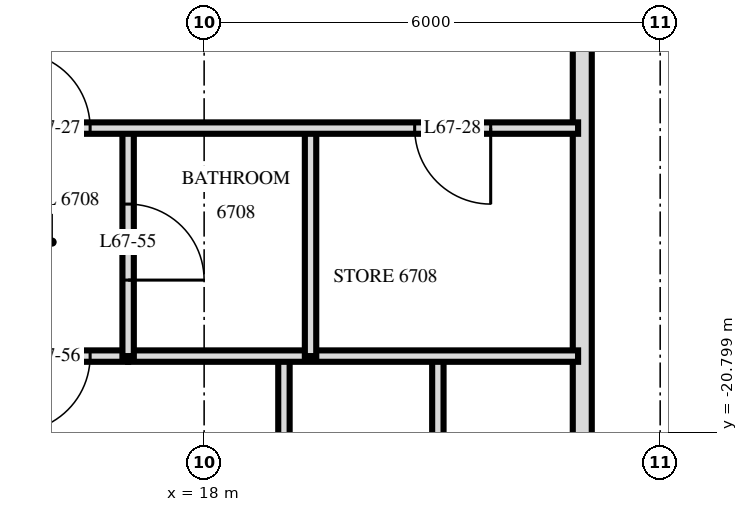
"""IFC4 building model, lengths in metres.
Left out: names, types, materials, properties, quantities, classifications, styles, units other than length and angle.
Written with IfcOpenShell. Run it as: python <this file> out.ifc"""

import sys

from ifc_helpers import new_model, si_unit, direction, frame, frame_2d, origin, place, context, subcontext, project, spatial, rectangle, extrude, element, fill, save


model = new_model("IFC4")
c1 = context("Model", 3, precision=1e-05, world=origin(), true_north=direction((0.0, 1.0)))
c2 = subcontext(c1, "Body", "Model", "MODEL_VIEW")
j1 = project(units=[si_unit("LENGTHUNIT", "METRE"), si_unit("PLANEANGLEUNIT", "RADIAN")], contexts=[c1])
p1 = place(None, origin())
s1 = spatial("IfcSite", under=j1, at=p1, CompositionType="ELEMENT")
p2 = place(p1, origin())
s2 = spatial("IfcBuilding", under=s1, at=p2, CompositionType="ELEMENT")
p3 = place(p2, frame((0.0, 0.0, 256.1)))
s3 = spatial("IfcBuildingStorey", under=s2, at=p3, CompositionType="ELEMENT", Elevation=256.1)
p4 = place(p3, frame((22.975, -29.275, 0.0), z_axis=(0.0, 0.0, 1.0), x_axis=(0.0, 1.0, 0.0)))
e1 = element("IfcWall", 1, at=p4, inside=s3, PredefinedType="SOLIDWALL", context=c2, shape_type="SweptSolid", body=[
    extrude(rectangle(XDim=25.951, YDim=0.25, at=frame_2d((12.975, 0.0))), origin(), (0.0, 0.0, 1.0), 3.22),
])
p5 = place(p4, frame((0.575, 0.0, 0.0)))
e2 = element("IfcOpeningElement", 2, at=p5, cuts=e1, PredefinedType="OPENING", context=c2, shape_type="SweptSolid", body=[
    extrude(rectangle(XDim=1.8, YDim=2.4, at=frame_2d((0.9, 1.2))), frame((0.0, 0.135, 0.0), z_axis=(0.0, -1.0, 0.0), x_axis=(1.0, 0.0, 0.0)), (0.0, 0.0, 1.0), 0.27),
])
p6 = place(p4, frame((3.325, 0.0, 0.9)))
e3 = element("IfcOpeningElement", 3, at=p6, cuts=e1, PredefinedType="OPENING", context=c2, shape_type="SweptSolid", body=[
    extrude(rectangle(XDim=1.8, YDim=1.5, at=frame_2d((0.9, 0.75))), frame((0.0, 0.135, 0.0), z_axis=(0.0, -1.0, 0.0), x_axis=(1.0, 0.0, 0.0)), (0.0, 0.0, 1.0), 0.27),
])
p7 = place(p4, frame((6.075, 0.0, 0.0)))
e4 = element("IfcOpeningElement", 4, at=p7, cuts=e1, PredefinedType="OPENING", context=c2, shape_type="SweptSolid", body=[
    extrude(rectangle(XDim=1.8, YDim=2.4, at=frame_2d((0.9, 1.2))), frame((0.0, 0.135, 0.0), z_axis=(0.0, -1.0, 0.0), x_axis=(1.0, 0.0, 0.0)), (0.0, 0.0, 1.0), 0.27),
])
p8 = place(p4, frame((14.875, 0.0, 0.0)))
e5 = element("IfcOpeningElement", 5, at=p8, cuts=e1, PredefinedType="OPENING", context=c2, shape_type="SweptSolid", body=[
    extrude(rectangle(XDim=1.8, YDim=2.4, at=frame_2d((0.9, 1.2))), frame((0.0, 0.135, 0.0), z_axis=(0.0, -1.0, 0.0), x_axis=(1.0, 0.0, 0.0)), (0.0, 0.0, 1.0), 0.27),
])
p9 = place(p4, frame((17.575, 0.0, 0.9)))
e6 = element("IfcOpeningElement", 6, at=p9, cuts=e1, PredefinedType="OPENING", context=c2, shape_type="SweptSolid", body=[
    extrude(rectangle(XDim=2.4, YDim=1.5, at=frame_2d((1.2, 0.75))), frame((0.0, 0.135, 0.0), z_axis=(0.0, -1.0, 0.0), x_axis=(1.0, 0.0, 0.0)), (0.0, 0.0, 1.0), 0.27),
])
p10 = place(p4, frame((22.925, 0.0, 0.0)))
e7 = element("IfcOpeningElement", 7, at=p10, cuts=e1, PredefinedType="OPENING", context=c2, shape_type="SweptSolid", body=[
    extrude(rectangle(XDim=1.8, YDim=2.4, at=frame_2d((0.9, 1.2))), frame((0.0, 0.135, 0.0), z_axis=(0.0, -1.0, 0.0), x_axis=(1.0, 0.0, 0.0)), (0.0, 0.0, 1.0), 0.27),
])
p11 = place(p3, frame((21.075, -32.666, 0.0), z_axis=(0.0, 0.0, 1.0), x_axis=(0.0, 1.0, 0.0)))
e8 = element("IfcWall", 8, at=p11, inside=s3, PredefinedType="PARTITIONING", context=c2, shape_type="SweptSolid", body=[
    extrude(rectangle(XDim=12.866, YDim=0.15, at=frame_2d((6.433, 0.0))), origin(), (0.0, 0.0, 1.0), 3.22),
])
p12 = place(p11, frame((5.846, 0.0, 0.0)))
e9 = element("IfcOpeningElement", 9, at=p12, cuts=e8, PredefinedType="OPENING", context=c2, shape_type="SweptSolid", body=[
    extrude(rectangle(XDim=0.9, YDim=2.1, at=frame_2d((0.45, 1.05))), frame((0.0, 0.085, 0.0), z_axis=(0.0, -1.0, 0.0), x_axis=(1.0, 0.0, 0.0)), (0.0, 0.0, 1.0), 0.17),
])
p13 = place(p3, frame((19.4, -19.8, 0.0), z_axis=(0.0, 0.0, 1.0), x_axis=(0.0, 1.0, 0.0)))
e10 = element("IfcWall", 10, at=p13, inside=s3, PredefinedType="PARTITIONING", context=c2, shape_type="SweptSolid", body=[
    extrude(rectangle(XDim=3.0, YDim=0.15, at=frame_2d((1.5, 0.0))), origin(), (0.0, 0.0, 1.0), 3.22),
])
p14 = place(p3, frame((19.05, -33.527, 0.0), z_axis=(0.0, 0.0, 1.0), x_axis=(0.0, 1.0, 0.0)))
e11 = element("IfcWall", 11, at=p14, inside=s3, PredefinedType="PARTITIONING", context=c2, shape_type="SweptSolid", body=[
    extrude(rectangle(XDim=13.727, YDim=0.15, at=frame_2d((6.864, 0.0))), origin(), (0.0, 0.0, 1.0), 3.22),
])
p15 = place(p14, frame((6.307, 0.0, 0.0)))
e12 = element("IfcOpeningElement", 12, at=p15, cuts=e11, PredefinedType="OPENING", context=c2, shape_type="SweptSolid", body=[
    extrude(rectangle(XDim=0.9, YDim=2.1, at=frame_2d((0.45, 1.05))), frame((0.0, 0.085, 0.0), z_axis=(0.0, -1.0, 0.0), x_axis=(1.0, 0.0, 0.0)), (0.0, 0.0, 1.0), 0.17),
])
p16 = place(p3, frame((17.0, -19.8, 0.0), z_axis=(0.0, 0.0, 1.0), x_axis=(0.0, 1.0, 0.0)))
e13 = element("IfcWall", 13, at=p16, inside=s3, PredefinedType="PARTITIONING", context=c2, shape_type="SweptSolid", body=[
    extrude(rectangle(XDim=3.0, YDim=0.15, at=frame_2d((1.5, 0.0))), origin(), (0.0, 0.0, 1.0), 3.22),
])
p17 = place(p16, frame((1.0, 0.0, 0.0)))
e14 = element("IfcOpeningElement", 14, at=p17, cuts=e13, PredefinedType="OPENING", context=c2, shape_type="SweptSolid", body=[
    extrude(rectangle(XDim=1.0, YDim=2.1, at=frame_2d((0.5, 1.05))), frame((0.0, 0.085, 0.0), z_axis=(0.0, -1.0, 0.0), x_axis=(1.0, 0.0, 0.0)), (0.0, 0.0, 1.0), 0.17),
])
p18 = place(p3, frame((15.0, -19.8, 0.0), z_axis=(0.0, 0.0, 1.0), x_axis=(1.0, 0.0, 0.0)))
e15 = element("IfcWall", 15, at=p18, inside=s3, PredefinedType="PARTITIONING", context=c2, shape_type="SweptSolid", body=[
    extrude(rectangle(XDim=2.0, YDim=0.15, at=frame_2d((1.0, 0.0))), origin(), (0.0, 0.0, 1.0), 3.22),
])
p19 = place(p18, frame((0.5, 0.0, 0.0)))
e16 = element("IfcOpeningElement", 16, at=p19, cuts=e15, PredefinedType="OPENING", context=c2, shape_type="SweptSolid", body=[
    extrude(rectangle(XDim=1.0, YDim=2.1, at=frame_2d((0.5, 1.05))), frame((0.0, 0.085, 0.0), z_axis=(0.0, -1.0, 0.0), x_axis=(1.0, 0.0, 0.0)), (0.0, 0.0, 1.0), 0.17),
])
p20 = place(p3, frame((17.0, -19.8, 0.0), z_axis=(0.0, 0.0, 1.0), x_axis=(1.0, 0.0, 0.0)))
e17 = element("IfcWall", 17, at=p20, inside=s3, PredefinedType="PARTITIONING", context=c2, shape_type="SweptSolid", body=[
    extrude(rectangle(XDim=5.92, YDim=0.15, at=frame_2d((2.96, 0.0))), origin(), (0.0, 0.0, 1.0), 3.22),
])
p21 = place(p3, frame((-22.92, -16.8, 0.0), z_axis=(0.0, 0.0, 1.0), x_axis=(1.0, 0.0, 0.0)))
e18 = element("IfcWall", 18, at=p21, inside=s3, PredefinedType="PARTITIONING", context=c2, shape_type="SweptSolid", body=[
    extrude(rectangle(XDim=45.84, YDim=0.15, at=frame_2d((22.92, 0.0))), origin(), (0.0, 0.0, 1.0), 3.22),
])
p22 = place(p21, frame((15.67, 0.0, 0.0)))
e19 = element("IfcOpeningElement", 19, at=p22, cuts=e18, PredefinedType="OPENING", context=c2, shape_type="SweptSolid", body=[
    extrude(rectangle(XDim=1.0, YDim=2.1, at=frame_2d((0.5, 1.05))), frame((0.0, 0.085, 0.0), z_axis=(0.0, -1.0, 0.0), x_axis=(1.0, 0.0, 0.0)), (0.0, 0.0, 1.0), 0.17),
])
p23 = place(p21, frame((18.77, 0.0, 0.0)))
e20 = element("IfcOpeningElement", 20, at=p23, cuts=e18, PredefinedType="OPENING", context=c2, shape_type="SweptSolid", body=[
    extrude(rectangle(XDim=1.0, YDim=2.1, at=frame_2d((0.5, 1.05))), frame((0.0, 0.085, 0.0), z_axis=(0.0, -1.0, 0.0), x_axis=(1.0, 0.0, 0.0)), (0.0, 0.0, 1.0), 0.17),
])
p24 = place(p21, frame((20.07, 0.0, 0.0)))
e21 = element("IfcOpeningElement", 21, at=p24, cuts=e18, PredefinedType="OPENING", context=c2, shape_type="SweptSolid", body=[
    extrude(rectangle(XDim=1.0, YDim=2.1, at=frame_2d((0.5, 1.05))), frame((0.0, 0.085, 0.0), z_axis=(0.0, -1.0, 0.0), x_axis=(1.0, 0.0, 0.0)), (0.0, 0.0, 1.0), 0.17),
])
p25 = place(p21, frame((24.77, 0.0, 0.0)))
e22 = element("IfcOpeningElement", 22, at=p25, cuts=e18, PredefinedType="OPENING", context=c2, shape_type="SweptSolid", body=[
    extrude(rectangle(XDim=1.0, YDim=2.1, at=frame_2d((0.5, 1.05))), frame((0.0, 0.085, 0.0), z_axis=(0.0, -1.0, 0.0), x_axis=(1.0, 0.0, 0.0)), (0.0, 0.0, 1.0), 0.17),
])
p26 = place(p21, frame((26.07, 0.0, 0.0)))
e23 = element("IfcOpeningElement", 23, at=p26, cuts=e18, PredefinedType="OPENING", context=c2, shape_type="SweptSolid", body=[
    extrude(rectangle(XDim=1.0, YDim=2.1, at=frame_2d((0.5, 1.05))), frame((0.0, 0.085, 0.0), z_axis=(0.0, -1.0, 0.0), x_axis=(1.0, 0.0, 0.0)), (0.0, 0.0, 1.0), 0.17),
])
p27 = place(p21, frame((30.77, 0.0, 0.0)))
e24 = element("IfcOpeningElement", 24, at=p27, cuts=e18, PredefinedType="OPENING", context=c2, shape_type="SweptSolid", body=[
    extrude(rectangle(XDim=1.0, YDim=2.1, at=frame_2d((0.5, 1.05))), frame((0.0, 0.085, 0.0), z_axis=(0.0, -1.0, 0.0), x_axis=(1.0, 0.0, 0.0)), (0.0, 0.0, 1.0), 0.17),
])
p28 = place(p21, frame((7.02, 0.0, 0.0)))
e25 = element("IfcOpeningElement", 25, at=p28, cuts=e18, PredefinedType="OPENING", context=c2, shape_type="SweptSolid", body=[
    extrude(rectangle(XDim=1.0, YDim=2.1, at=frame_2d((0.5, 1.05))), frame((0.0, 0.085, 0.0), z_axis=(0.0, -1.0, 0.0), x_axis=(1.0, 0.0, 0.0)), (0.0, 0.0, 1.0), 0.17),
])
p29 = place(p21, frame((38.42, 0.0, 0.0)))
e26 = element("IfcOpeningElement", 26, at=p29, cuts=e18, PredefinedType="OPENING", context=c2, shape_type="SweptSolid", body=[
    extrude(rectangle(XDim=1.0, YDim=2.1, at=frame_2d((0.5, 1.05))), frame((0.0, 0.085, 0.0), z_axis=(0.0, -1.0, 0.0), x_axis=(1.0, 0.0, 0.0)), (0.0, 0.0, 1.0), 0.17),
])
p30 = place(p21, frame((43.69, 0.0, 0.0)))
e27 = element("IfcOpeningElement", 27, at=p30, cuts=e18, PredefinedType="OPENING", context=c2, shape_type="SweptSolid", body=[
    extrude(rectangle(XDim=1.0, YDim=2.1, at=frame_2d((0.5, 1.05))), frame((0.0, 0.085, 0.0), z_axis=(0.0, -1.0, 0.0), x_axis=(1.0, 0.0, 0.0)), (0.0, 0.0, 1.0), 0.17),
])
p31 = place(p29, origin())
e28 = element("IfcDoor", 28, at=p31, inside=s3, OperationType="SINGLE_SWING_RIGHT", PredefinedType="DOOR", context=c2, shape_type="SweptSolid", body=[
    extrude(rectangle(XDim=1.0, YDim=2.1, at=frame_2d((0.5, 1.05))), frame((0.0, 0.025, 0.0), z_axis=(0.0, -1.0, 0.0), x_axis=(1.0, 0.0, 0.0)), (0.0, 0.0, 1.0), 0.05),
])
fill(e26, e28)
p32 = place(p30, frame((0.5, 0.0, 0.0), z_axis=(0.0, 0.0, 1.0), x_axis=(-1.0, 0.0, 0.0)))
e29 = element("IfcDoor", 29, at=p32, inside=s3, OperationType="SINGLE_SWING_RIGHT", PredefinedType="DOOR", context=c2, shape_type="SweptSolid", body=[
    extrude(rectangle(XDim=1.0, YDim=2.1, at=frame_2d((0.0, 1.05))), frame((0.0, -0.025, 0.0), z_axis=(0.0, 1.0, 0.0), x_axis=(-1.0, 0.0, 0.0)), (0.0, 0.0, 1.0), 0.05),
])
fill(e27, e29)
p33 = place(p17, frame((0.5, 0.0, 0.0), z_axis=(0.0, 0.0, 1.0), x_axis=(-1.0, 0.0, 0.0)))
e30 = element("IfcDoor", 30, at=p33, inside=s3, OperationType="SINGLE_SWING_LEFT", PredefinedType="DOOR", context=c2, shape_type="SweptSolid", body=[
    extrude(rectangle(XDim=1.0, YDim=2.1, at=frame_2d((0.0, 1.05))), frame((0.0, -0.025, 0.0), z_axis=(0.0, 1.0, 0.0), x_axis=(-1.0, 0.0, 0.0)), (0.0, 0.0, 1.0), 0.05),
])
fill(e14, e30)
p34 = place(p19, frame((0.5, 0.0, 0.0), z_axis=(0.0, 0.0, 1.0), x_axis=(-1.0, 0.0, 0.0)))
e31 = element("IfcDoor", 31, at=p34, inside=s3, OperationType="SINGLE_SWING_LEFT", PredefinedType="DOOR", context=c2, shape_type="SweptSolid", body=[
    extrude(rectangle(XDim=1.0, YDim=2.1, at=frame_2d((0.0, 1.05))), frame((0.0, -0.025, 0.0), z_axis=(0.0, 1.0, 0.0), x_axis=(-1.0, 0.0, 0.0)), (0.0, 0.0, 1.0), 0.05),
])
fill(e16, e31)
save(model, sys.argv[1])
